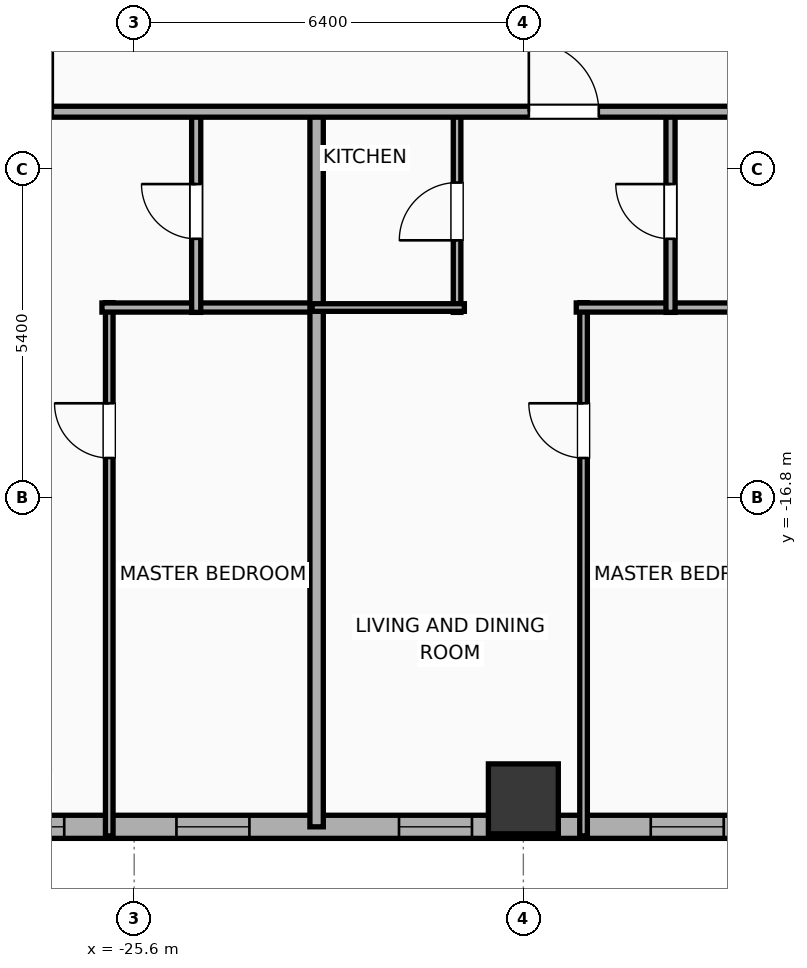
"""IFC4 building model, lengths in metres.
Left out: names, types, materials, properties, quantities, classifications, styles, units other than length and angle.
Written with IfcOpenShell. Run it as: python <this file> out.ifc"""

import sys

from ifc_helpers import new_model, si_unit, direction, frame, frame_2d, origin, origin_2d, place, context, subcontext, project, spatial, rectangle, hollow_rectangle, extrude, element, fill, save


model = new_model("IFC4")
c1 = context("Model", 3, precision=1e-05, world=origin(), true_north=direction((0.0, 1.0)))
c2 = subcontext(c1, "Body", "Model", "MODEL_VIEW")
j1 = project(units=[si_unit("LENGTHUNIT", "METRE"), si_unit("PLANEANGLEUNIT", "RADIAN")], contexts=[c1])
p1 = place(None, origin())
s1 = spatial("IfcSite", under=j1, at=p1, CompositionType="ELEMENT")
p2 = place(p1, origin())
s2 = spatial("IfcBuilding", under=s1, at=p2, CompositionType="ELEMENT")
p3 = place(p2, frame((0.0, 0.0, 57.2)))
s3 = spatial("IfcBuildingStorey", under=s2, at=p3, CompositionType="ELEMENT", Elevation=57.2)
p4 = place(p3, frame((-19.2, -21.75, 0.0), z_axis=(0.0, 0.0, 1.0), x_axis=(1.0, 0.0, 0.0)))
e1 = element("IfcColumn", 1, at=p4, inside=s3, PredefinedType="COLUMN", context=c2, shape_type="SweptSolid", body=[
    extrude(hollow_rectangle(XDim=1.15, YDim=1.15, WallThickness=0.04, at=origin_2d()), origin(), (0.0, 0.0, 1.0), 3.9),
])
p5 = place(p3, frame((22.381, -22.21, 0.0), z_axis=(0.0, 0.0, 1.0), x_axis=(-1.0, 0.0, 0.0)))
e2 = element("IfcWall", 2, at=p5, inside=s3, PredefinedType="ELEMENTEDWALL", context=c2, shape_type="SweptSolid", body=[
    extrude(rectangle(XDim=51.963, YDim=0.38, at=frame_2d((25.981, 0.0))), origin(), (0.0, 0.0, 1.0), 3.65),
])
p6 = place(p5, frame((6.61, 0.0, 0.75)))
e3 = element("IfcOpeningElement", 3, at=p6, cuts=e2, PredefinedType="OPENING", context=c2, shape_type="SweptSolid", body=[
    extrude(rectangle(XDim=2.4, YDim=2.1, at=frame_2d((1.2, 1.05))), frame((0.0, 0.2, 0.0), z_axis=(0.0, -1.0, 0.0), x_axis=(1.0, 0.0, 0.0)), (0.0, 0.0, 1.0), 0.4),
])
p7 = place(p5, frame((25.631, 0.0, 0.75)))
e4 = element("IfcOpeningElement", 4, at=p7, cuts=e2, PredefinedType="OPENING", context=c2, shape_type="SweptSolid", body=[
    extrude(rectangle(XDim=2.4, YDim=2.1, at=frame_2d((1.2, 1.05))), frame((0.0, 0.2, 0.0), z_axis=(0.0, -1.0, 0.0), x_axis=(1.0, 0.0, 0.0)), (0.0, 0.0, 1.0), 0.4),
])
p8 = place(p5, frame((49.132, 0.0, 0.75)))
e5 = element("IfcOpeningElement", 5, at=p8, cuts=e2, PredefinedType="OPENING", context=c2, shape_type="SweptSolid", body=[
    extrude(rectangle(XDim=1.2, YDim=2.05, at=frame_2d((0.6, 1.025))), frame((0.0, 0.2, 0.0), z_axis=(0.0, -1.0, 0.0), x_axis=(1.0, 0.0, 0.0)), (0.0, 0.0, 1.0), 0.4),
])
p9 = place(p5, frame((46.086, 0.0, 0.75)))
e6 = element("IfcOpeningElement", 6, at=p9, cuts=e2, PredefinedType="OPENING", context=c2, shape_type="SweptSolid", body=[
    extrude(rectangle(XDim=1.2, YDim=2.05, at=frame_2d((0.6, 1.025))), frame((0.0, 0.2, 0.0), z_axis=(0.0, -1.0, 0.0), x_axis=(1.0, 0.0, 0.0)), (0.0, 0.0, 1.0), 0.4),
])
p10 = place(p5, frame((42.426, 0.0, 0.75)))
e7 = element("IfcOpeningElement", 7, at=p10, cuts=e2, PredefinedType="OPENING", context=c2, shape_type="SweptSolid", body=[
    extrude(rectangle(XDim=1.2, YDim=2.05, at=frame_2d((0.6, 1.025))), frame((0.0, 0.2, 0.0), z_axis=(0.0, -1.0, 0.0), x_axis=(1.0, 0.0, 0.0)), (0.0, 0.0, 1.0), 0.4),
])
p11 = place(p5, frame((38.286, 0.0, 0.75)))
e8 = element("IfcOpeningElement", 8, at=p11, cuts=e2, PredefinedType="OPENING", context=c2, shape_type="SweptSolid", body=[
    extrude(rectangle(XDim=1.2, YDim=2.05, at=frame_2d((0.6, 1.025))), frame((0.0, 0.2, 0.0), z_axis=(0.0, -1.0, 0.0), x_axis=(1.0, 0.0, 0.0)), (0.0, 0.0, 1.0), 0.4),
])
p12 = place(p5, frame((35.219, 0.0, 0.75)))
e9 = element("IfcOpeningElement", 9, at=p12, cuts=e2, PredefinedType="OPENING", context=c2, shape_type="SweptSolid", body=[
    extrude(rectangle(XDim=1.2, YDim=2.05, at=frame_2d((0.6, 1.025))), frame((0.0, 0.2, 0.0), z_axis=(0.0, -1.0, 0.0), x_axis=(1.0, 0.0, 0.0)), (0.0, 0.0, 1.0), 0.4),
])
p13 = place(p5, frame((32.039, 0.0, 0.75)))
e10 = element("IfcOpeningElement", 10, at=p13, cuts=e2, PredefinedType="OPENING", context=c2, shape_type="SweptSolid", body=[
    extrude(rectangle(XDim=1.2, YDim=2.05, at=frame_2d((0.6, 1.025))), frame((0.0, 0.2, 0.0), z_axis=(0.0, -1.0, 0.0), x_axis=(1.0, 0.0, 0.0)), (0.0, 0.0, 1.0), 0.4),
])
p14 = place(p5, frame((22.686, 0.0, 0.75)))
e11 = element("IfcOpeningElement", 11, at=p14, cuts=e2, PredefinedType="OPENING", context=c2, shape_type="SweptSolid", body=[
    extrude(rectangle(XDim=1.2, YDim=2.05, at=frame_2d((0.6, 1.025))), frame((0.0, 0.2, 0.0), z_axis=(0.0, -1.0, 0.0), x_axis=(1.0, 0.0, 0.0)), (0.0, 0.0, 1.0), 0.4),
])
p15 = place(p5, frame((18.786, 0.0, 0.75)))
e12 = element("IfcOpeningElement", 12, at=p15, cuts=e2, PredefinedType="OPENING", context=c2, shape_type="SweptSolid", body=[
    extrude(rectangle(XDim=1.2, YDim=2.05, at=frame_2d((0.6, 1.025))), frame((0.0, 0.2, 0.0), z_axis=(0.0, -1.0, 0.0), x_axis=(1.0, 0.0, 0.0)), (0.0, 0.0, 1.0), 0.4),
])
p16 = place(p5, frame((14.886, 0.0, 0.75)))
e13 = element("IfcOpeningElement", 13, at=p16, cuts=e2, PredefinedType="OPENING", context=c2, shape_type="SweptSolid", body=[
    extrude(rectangle(XDim=1.2, YDim=2.05, at=frame_2d((0.6, 1.025))), frame((0.0, 0.2, 0.0), z_axis=(0.0, -1.0, 0.0), x_axis=(1.0, 0.0, 0.0)), (0.0, 0.0, 1.0), 0.4),
])
p17 = place(p5, frame((11.826, 0.0, 0.75)))
e14 = element("IfcOpeningElement", 14, at=p17, cuts=e2, PredefinedType="OPENING", context=c2, shape_type="SweptSolid", body=[
    extrude(rectangle(XDim=1.2, YDim=2.05, at=frame_2d((0.6, 1.025))), frame((0.0, 0.2, 0.0), z_axis=(0.0, -1.0, 0.0), x_axis=(1.0, 0.0, 0.0)), (0.0, 0.0, 1.0), 0.4),
])
p18 = place(p5, frame((2.836, 0.0, 0.75)))
e15 = element("IfcOpeningElement", 15, at=p18, cuts=e2, PredefinedType="OPENING", context=c2, shape_type="SweptSolid", body=[
    extrude(rectangle(XDim=1.2, YDim=2.05, at=frame_2d((0.6, 1.025))), frame((0.0, 0.2, 0.0), z_axis=(0.0, -1.0, 0.0), x_axis=(1.0, 0.0, 0.0)), (0.0, 0.0, 1.0), 0.4),
])
p19 = place(p3, frame((-26.01, -22.36, 0.0), z_axis=(0.0, 0.0, 1.0), x_axis=(0.0, 1.0, 0.0)))
e16 = element("IfcWall", 16, at=p19, inside=s3, PredefinedType="PARTITIONING", context=c2, shape_type="SweptSolid", body=[
    extrude(rectangle(XDim=8.77, YDim=0.125, at=frame_2d((4.385, 0.0))), origin(), (0.0, 0.0, 1.0), 3.65),
])
p20 = place(p19, frame((6.215, 0.0, 0.0)))
e17 = element("IfcOpeningElement", 17, at=p20, cuts=e16, PredefinedType="OPENING", context=c2, shape_type="SweptSolid", body=[
    extrude(rectangle(XDim=0.9, YDim=2.05, at=frame_2d((0.45, 1.025))), frame((0.0, 0.073, 0.0), z_axis=(0.0, -1.0, 0.0), x_axis=(1.0, 0.0, 0.0)), (0.0, 0.0, 1.0), 0.145),
])
p21 = place(p3, frame((-26.13, -13.67, 0.0), z_axis=(0.0, 0.0, 1.0), x_axis=(1.0, 0.0, 0.0)))
e18 = element("IfcWall", 18, at=p21, inside=s3, PredefinedType="PLUMBINGWALL", context=c2, shape_type="SweptSolid", body=[
    extrude(rectangle(XDim=3.605, YDim=0.15, at=frame_2d((1.802, 0.0))), origin(), (0.0, 0.0, 1.0), 3.65),
])
p22 = place(p3, frame((-24.58, -13.75, 0.0), z_axis=(0.0, 0.0, 1.0), x_axis=(0.0, 1.0, 0.0)))
e19 = element("IfcWall", 19, at=p22, inside=s3, PredefinedType="PLUMBINGWALL", context=c2, shape_type="SweptSolid", body=[
    extrude(rectangle(XDim=3.32, YDim=0.15, at=frame_2d((1.66, 0.0))), origin(), (0.0, 0.0, 1.0), 3.65),
])
p23 = place(p22, frame((1.21, 0.0, 0.0)))
e20 = element("IfcOpeningElement", 20, at=p23, cuts=e19, PredefinedType="OPENING", context=c2, shape_type="SweptSolid", body=[
    extrude(rectangle(XDim=0.9, YDim=2.05, at=frame_2d((0.45, 1.025))), frame((0.0, 0.085, 0.0), z_axis=(0.0, -1.0, 0.0), x_axis=(1.0, 0.0, 0.0)), (0.0, 0.0, 1.0), 0.17),
])
p24 = place(p3, frame((-22.6, -22.21, 0.0), z_axis=(0.0, 0.0, 1.0), x_axis=(0.0, 1.0, 0.0)))
e21 = element("IfcWall", 21, at=p24, inside=s3, PredefinedType="PARTITIONING", context=c2, shape_type="SweptSolid", body=[
    extrude(rectangle(XDim=11.84, YDim=0.22, at=frame_2d((5.92, 0.0))), origin(), (0.0, 0.0, 1.0), 3.65),
])
p25 = place(p3, frame((-18.21, -22.36, 0.0), z_axis=(0.0, 0.0, 1.0), x_axis=(0.0, 1.0, 0.0)))
e22 = element("IfcWall", 22, at=p25, inside=s3, PredefinedType="PARTITIONING", context=c2, shape_type="SweptSolid", body=[
    extrude(rectangle(XDim=8.77, YDim=0.125, at=frame_2d((4.385, 0.0))), origin(), (0.0, 0.0, 1.0), 3.65),
])
p26 = place(p25, frame((6.215, 0.0, 0.0)))
e23 = element("IfcOpeningElement", 23, at=p26, cuts=e22, PredefinedType="OPENING", context=c2, shape_type="SweptSolid", body=[
    extrude(rectangle(XDim=0.9, YDim=2.05, at=frame_2d((0.45, 1.025))), frame((0.0, 0.073, 0.0), z_axis=(0.0, -1.0, 0.0), x_axis=(1.0, 0.0, 0.0)), (0.0, 0.0, 1.0), 0.145),
])
p27 = place(p3, frame((-18.33, -13.67, 0.0), z_axis=(0.0, 0.0, 1.0), x_axis=(1.0, 0.0, 0.0)))
e24 = element("IfcWall", 24, at=p27, inside=s3, PredefinedType="PLUMBINGWALL", context=c2, shape_type="SweptSolid", body=[
    extrude(rectangle(XDim=3.79, YDim=0.15, at=frame_2d((1.895, 0.0))), origin(), (0.0, 0.0, 1.0), 3.65),
])
p28 = place(p3, frame((-20.29, -13.75, 0.0), z_axis=(0.0, 0.0, 1.0), x_axis=(0.0, 1.0, 0.0)))
e25 = element("IfcWall", 25, at=p28, inside=s3, PredefinedType="PARTITIONING", context=c2, shape_type="SweptSolid", body=[
    extrude(rectangle(XDim=3.32, YDim=0.125, at=frame_2d((1.66, 0.0))), origin(), (0.0, 0.0, 1.0), 3.65),
])
p29 = place(p28, frame((1.185, 0.0, 0.0)))
e26 = element("IfcOpeningElement", 26, at=p29, cuts=e25, PredefinedType="OPENING", context=c2, shape_type="SweptSolid", body=[
    extrude(rectangle(XDim=0.95, YDim=2.05, at=frame_2d((0.475, 1.025))), frame((0.0, 0.073, 0.0), z_axis=(0.0, -1.0, 0.0), x_axis=(1.0, 0.0, 0.0)), (0.0, 0.0, 1.0), 0.145),
])
p30 = place(p3, frame((-22.675, -13.67, 0.0), z_axis=(0.0, 0.0, 1.0), x_axis=(1.0, 0.0, 0.0)))
e27 = element("IfcWall", 27, at=p30, inside=s3, PredefinedType="PARTITIONING", context=c2, shape_type="SweptSolid", body=[
    extrude(rectangle(XDim=2.505, YDim=0.125, at=frame_2d((1.252, 0.0))), origin(), (0.0, 0.0, 1.0), 3.65),
])
p31 = place(p3, frame((-16.78, -13.75, 0.0), z_axis=(0.0, 0.0, 1.0), x_axis=(0.0, 1.0, 0.0)))
e28 = element("IfcWall", 28, at=p31, inside=s3, PredefinedType="PLUMBINGWALL", context=c2, shape_type="SweptSolid", body=[
    extrude(rectangle(XDim=3.32, YDim=0.15, at=frame_2d((1.66, 0.0))), origin(), (0.0, 0.0, 1.0), 3.65),
])
p32 = place(p31, frame((1.21, 0.0, 0.0)))
e29 = element("IfcOpeningElement", 29, at=p32, cuts=e28, PredefinedType="OPENING", context=c2, shape_type="SweptSolid", body=[
    extrude(rectangle(XDim=0.9, YDim=2.05, at=frame_2d((0.45, 1.025))), frame((0.0, 0.085, 0.0), z_axis=(0.0, -1.0, 0.0), x_axis=(1.0, 0.0, 0.0)), (0.0, 0.0, 1.0), 0.17),
])
p33 = place(p3, frame((-33.41, -10.45, 0.0), z_axis=(0.0, 0.0, 1.0), x_axis=(1.0, 0.0, 0.0)))
e30 = element("IfcWall", 30, at=p33, inside=s3, PredefinedType="PARTITIONING", context=c2, shape_type="SweptSolid", body=[
    extrude(rectangle(XDim=59.62, YDim=0.18, at=frame_2d((29.81, 0.0))), origin(), (0.0, 0.0, 1.0), 3.65),
])
p34 = place(p33, frame((5.321, 0.0, 0.0)))
e31 = element("IfcOpeningElement", 31, at=p34, cuts=e30, PredefinedType="OPENING", context=c2, shape_type="SweptSolid", body=[
    extrude(rectangle(XDim=1.15, YDim=2.05, at=frame_2d((0.575, 1.025))), frame((0.0, 0.1, 0.0), z_axis=(0.0, -1.0, 0.0), x_axis=(1.0, 0.0, 0.0)), (0.0, 0.0, 1.0), 0.2),
])
p35 = place(p33, frame((14.3, 0.0, 0.0)))
e32 = element("IfcOpeningElement", 32, at=p35, cuts=e30, PredefinedType="OPENING", context=c2, shape_type="SweptSolid", body=[
    extrude(rectangle(XDim=1.15, YDim=2.05, at=frame_2d((0.575, 1.025))), frame((0.0, 0.1, 0.0), z_axis=(0.0, -1.0, 0.0), x_axis=(1.0, 0.0, 0.0)), (0.0, 0.0, 1.0), 0.2),
])
p36 = place(p33, frame((22.265, 0.0, 0.0)))
e33 = element("IfcOpeningElement", 33, at=p36, cuts=e30, PredefinedType="OPENING", context=c2, shape_type="SweptSolid", body=[
    extrude(rectangle(XDim=0.9, YDim=2.05, at=frame_2d((0.45, 1.025))), frame((0.0, 0.1, 0.0), z_axis=(0.0, -1.0, 0.0), x_axis=(1.0, 0.0, 0.0)), (0.0, 0.0, 1.0), 0.2),
])
p37 = place(p33, frame((29.903, 0.0, 0.0)))
e34 = element("IfcOpeningElement", 34, at=p37, cuts=e30, PredefinedType="OPENING", context=c2, shape_type="SweptSolid", body=[
    extrude(rectangle(XDim=1.15, YDim=2.05, at=frame_2d((0.575, 1.025))), frame((0.0, 0.1, 0.0), z_axis=(0.0, -1.0, 0.0), x_axis=(1.0, 0.0, 0.0)), (0.0, 0.0, 1.0), 0.2),
])
p38 = place(p33, frame((37.701, 0.0, 0.0)))
e35 = element("IfcOpeningElement", 35, at=p38, cuts=e30, PredefinedType="OPENING", context=c2, shape_type="SweptSolid", body=[
    extrude(rectangle(XDim=1.15, YDim=2.05, at=frame_2d((0.575, 1.025))), frame((0.0, 0.1, 0.0), z_axis=(0.0, -1.0, 0.0), x_axis=(1.0, 0.0, 0.0)), (0.0, 0.0, 1.0), 0.2),
])
p39 = place(p33, frame((45.654, 0.0, 0.0)))
e36 = element("IfcOpeningElement", 36, at=p39, cuts=e30, PredefinedType="OPENING", context=c2, shape_type="SweptSolid", body=[
    extrude(rectangle(XDim=0.9, YDim=2.05, at=frame_2d((0.45, 1.025))), frame((0.0, 0.1, 0.0), z_axis=(0.0, -1.0, 0.0), x_axis=(1.0, 0.0, 0.0)), (0.0, 0.0, 1.0), 0.2),
])
p40 = place(p33, frame((54.472, 0.0, 0.0)))
e37 = element("IfcOpeningElement", 37, at=p40, cuts=e30, PredefinedType="OPENING", context=c2, shape_type="SweptSolid", body=[
    extrude(rectangle(XDim=1.15, YDim=2.05, at=frame_2d((0.575, 1.025))), frame((0.0, 0.1, 0.0), z_axis=(0.0, -1.0, 0.0), x_axis=(1.0, 0.0, 0.0)), (0.0, 0.0, 1.0), 0.2),
])
p41 = place(p8, origin())
e38 = element("IfcWindow", 38, at=p41, inside=s3, PartitioningType="SINGLE_PANEL", PredefinedType="WINDOW", context=c2, shape_type="SweptSolid", body=[
    extrude(rectangle(XDim=1.2, YDim=2.05, at=frame_2d((0.6, 1.025))), frame((0.0, 0.03, 0.0), z_axis=(0.0, -1.0, 0.0), x_axis=(1.0, 0.0, 0.0)), (0.0, 0.0, 1.0), 0.06),
])
fill(e5, e38)
p42 = place(p9, origin())
e39 = element("IfcWindow", 39, at=p42, inside=s3, PartitioningType="SINGLE_PANEL", PredefinedType="WINDOW", context=c2, shape_type="SweptSolid", body=[
    extrude(rectangle(XDim=1.2, YDim=2.05, at=frame_2d((0.6, 1.025))), frame((0.0, 0.03, 0.0), z_axis=(0.0, -1.0, 0.0), x_axis=(1.0, 0.0, 0.0)), (0.0, 0.0, 1.0), 0.06),
])
fill(e6, e39)
p43 = place(p10, origin())
e40 = element("IfcWindow", 40, at=p43, inside=s3, PartitioningType="SINGLE_PANEL", PredefinedType="WINDOW", context=c2, shape_type="SweptSolid", body=[
    extrude(rectangle(XDim=1.2, YDim=2.05, at=frame_2d((0.6, 1.025))), frame((0.0, 0.03, 0.0), z_axis=(0.0, -1.0, 0.0), x_axis=(1.0, 0.0, 0.0)), (0.0, 0.0, 1.0), 0.06),
])
fill(e7, e40)
p44 = place(p11, origin())
e41 = element("IfcWindow", 41, at=p44, inside=s3, PartitioningType="SINGLE_PANEL", PredefinedType="WINDOW", context=c2, shape_type="SweptSolid", body=[
    extrude(rectangle(XDim=1.2, YDim=2.05, at=frame_2d((0.6, 1.025))), frame((0.0, 0.03, 0.0), z_axis=(0.0, -1.0, 0.0), x_axis=(1.0, 0.0, 0.0)), (0.0, 0.0, 1.0), 0.06),
])
fill(e8, e41)
p45 = place(p20, origin())
e42 = element("IfcDoor", 42, at=p45, inside=s3, OperationType="SINGLE_SWING_RIGHT", PredefinedType="DOOR", context=c2, shape_type="SweptSolid", body=[
    extrude(rectangle(XDim=0.9, YDim=2.05, at=frame_2d((0.45, 1.025))), frame((0.0, 0.025, 0.0), z_axis=(0.0, -1.0, 0.0), x_axis=(1.0, 0.0, 0.0)), (0.0, 0.0, 1.0), 0.05),
])
fill(e17, e42)
p46 = place(p23, origin())
e43 = element("IfcDoor", 43, at=p46, inside=s3, OperationType="SINGLE_SWING_RIGHT", PredefinedType="DOOR", context=c2, shape_type="SweptSolid", body=[
    extrude(rectangle(XDim=0.9, YDim=2.05, at=frame_2d((0.45, 1.025))), frame((0.0, 0.025, 0.0), z_axis=(0.0, -1.0, 0.0), x_axis=(1.0, 0.0, 0.0)), (0.0, 0.0, 1.0), 0.05),
])
fill(e20, e43)
p47 = place(p26, origin())
e44 = element("IfcDoor", 44, at=p47, inside=s3, OperationType="SINGLE_SWING_RIGHT", PredefinedType="DOOR", context=c2, shape_type="SweptSolid", body=[
    extrude(rectangle(XDim=0.9, YDim=2.05, at=frame_2d((0.45, 1.025))), frame((0.0, 0.025, 0.0), z_axis=(0.0, -1.0, 0.0), x_axis=(1.0, 0.0, 0.0)), (0.0, 0.0, 1.0), 0.05),
])
fill(e23, e44)
p48 = place(p29, origin())
e45 = element("IfcDoor", 45, at=p48, inside=s3, OperationType="SINGLE_SWING_LEFT", PredefinedType="DOOR", context=c2, shape_type="SweptSolid", body=[
    extrude(rectangle(XDim=0.95, YDim=2.05, at=frame_2d((0.475, 1.025))), frame((0.0, 0.025, 0.0), z_axis=(0.0, -1.0, 0.0), x_axis=(1.0, 0.0, 0.0)), (0.0, 0.0, 1.0), 0.05),
])
fill(e26, e45)
p49 = place(p32, origin())
e46 = element("IfcDoor", 46, at=p49, inside=s3, OperationType="SINGLE_SWING_RIGHT", PredefinedType="DOOR", context=c2, shape_type="SweptSolid", body=[
    extrude(rectangle(XDim=0.9, YDim=2.05, at=frame_2d((0.45, 1.025))), frame((0.0, 0.025, 0.0), z_axis=(0.0, -1.0, 0.0), x_axis=(1.0, 0.0, 0.0)), (0.0, 0.0, 1.0), 0.05),
])
fill(e29, e46)
p50 = place(p34, origin())
e47 = element("IfcDoor", 47, at=p50, inside=s3, OperationType="SINGLE_SWING_RIGHT", PredefinedType="DOOR", context=c2, shape_type="SweptSolid", body=[
    extrude(rectangle(XDim=1.15, YDim=2.05, at=frame_2d((0.575, 1.025))), frame((0.0, 0.025, 0.0), z_axis=(0.0, -1.0, 0.0), x_axis=(1.0, 0.0, 0.0)), (0.0, 0.0, 1.0), 0.05),
])
fill(e31, e47)
p51 = place(p35, origin())
e48 = element("IfcDoor", 48, at=p51, inside=s3, OperationType="SINGLE_SWING_LEFT", PredefinedType="DOOR", context=c2, shape_type="SweptSolid", body=[
    extrude(rectangle(XDim=1.15, YDim=2.05, at=frame_2d((0.575, 1.025))), frame((0.0, 0.025, 0.0), z_axis=(0.0, -1.0, 0.0), x_axis=(1.0, 0.0, 0.0)), (0.0, 0.0, 1.0), 0.05),
])
fill(e32, e48)
save(model, sys.argv[1])
